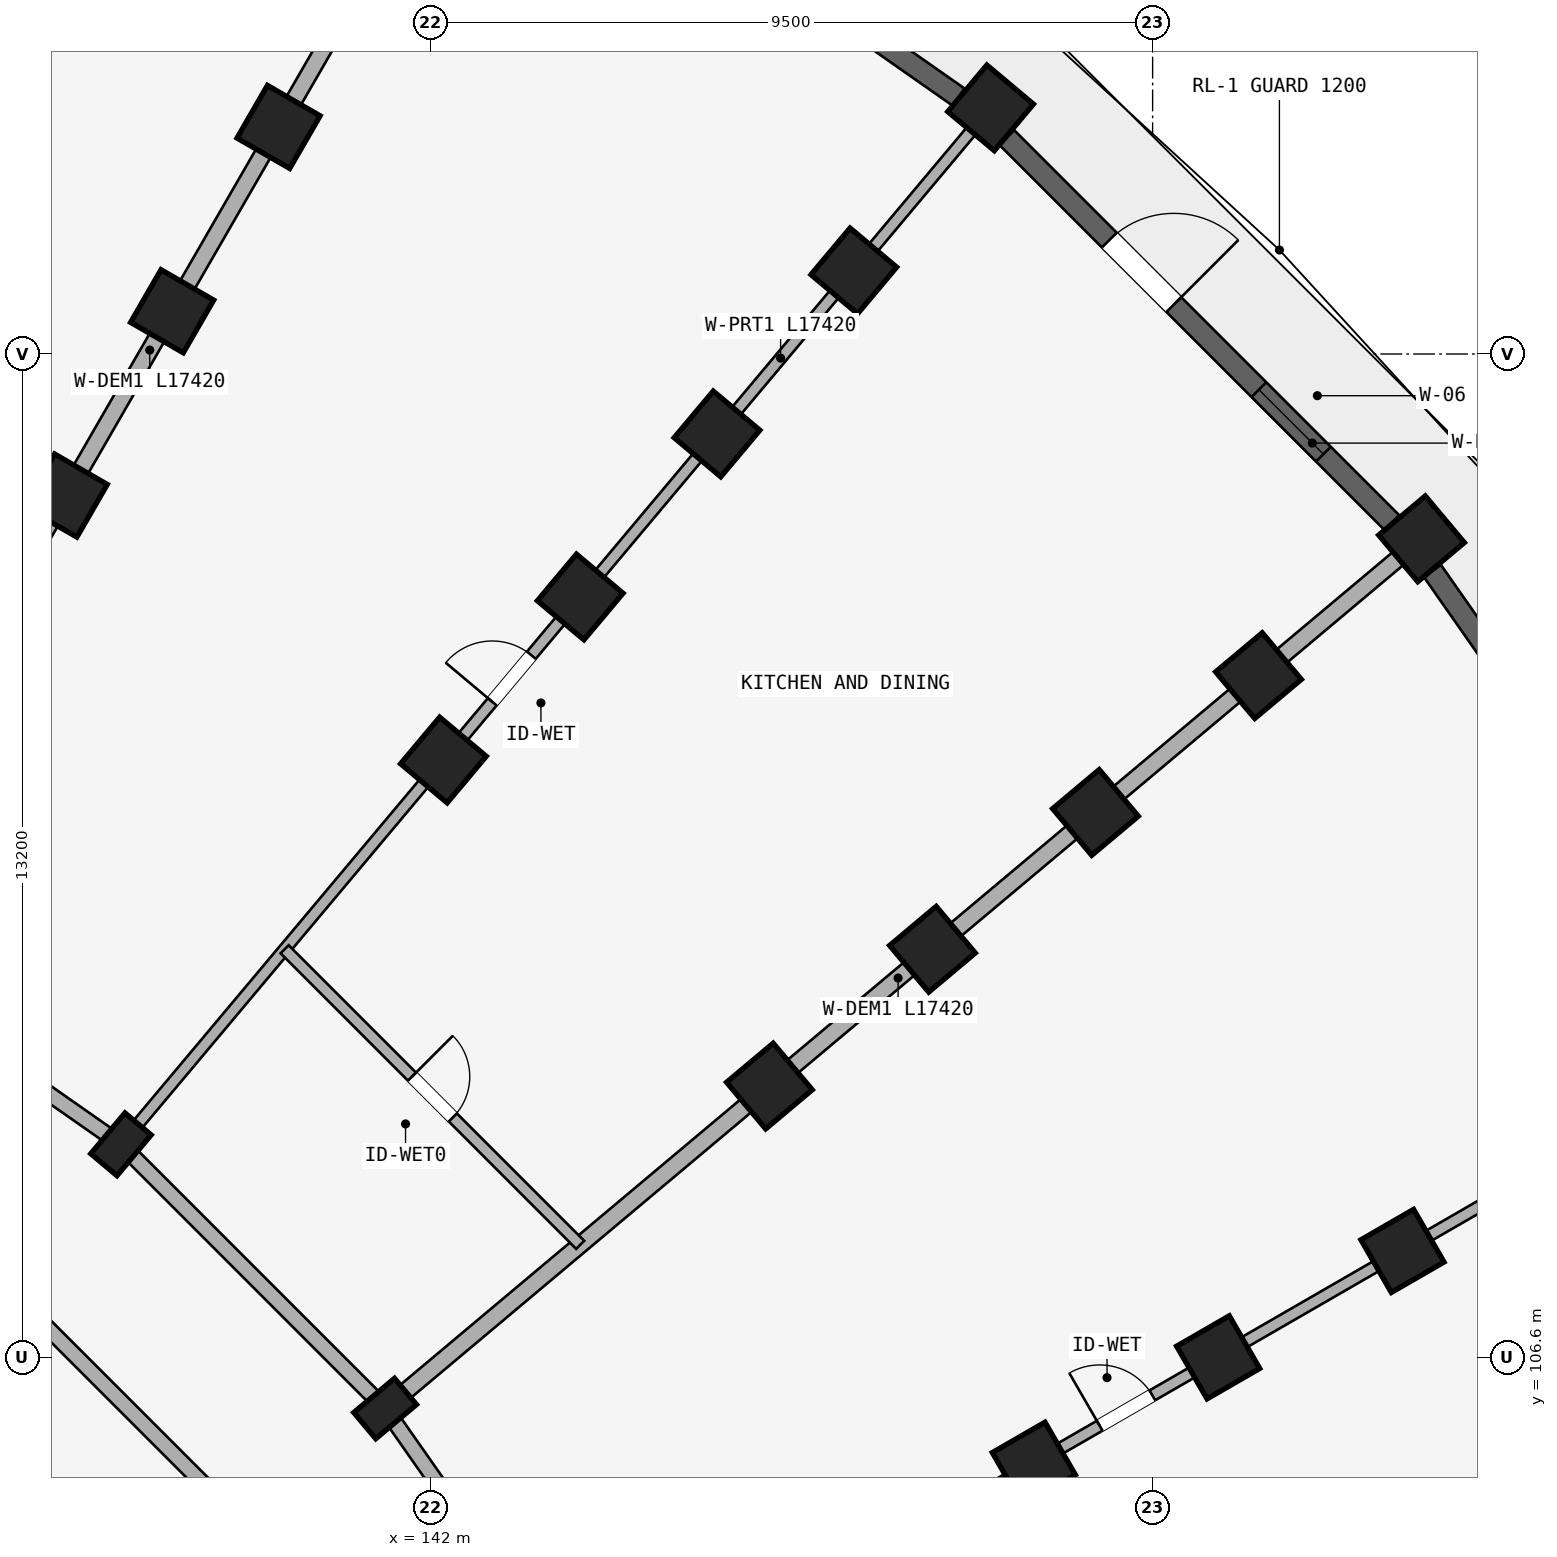
"""IFC4 building model, lengths in metres.
Left out: names, types, materials, properties, quantities, classifications, styles, units other than length and angle.
Written with IfcOpenShell. Run it as: python <this file> out.ifc"""

import sys

from ifc_helpers import new_model, si_unit, direction, frame, frame_2d, origin, origin_2d, place, context, subcontext, project, spatial, rectangle, extrude, element, fill, save


model = new_model("IFC4")
c1 = context("Model", 3, precision=1e-05, world=origin(), true_north=direction((0.0, 1.0)))
c2 = subcontext(c1, "Body", "Model", "MODEL_VIEW")
j1 = project(units=[si_unit("LENGTHUNIT", "METRE"), si_unit("PLANEANGLEUNIT", "RADIAN")], contexts=[c1])
p1 = place(None, origin())
s1 = spatial("IfcSite", under=j1, at=p1, CompositionType="ELEMENT")
p2 = place(p1, origin())
s2 = spatial("IfcBuilding", under=s1, at=p2, CompositionType="ELEMENT")
p3 = place(p2, frame((0.0, 0.0, 15.0)))
s3 = spatial("IfcBuildingStorey", under=s2, at=p3, CompositionType="ELEMENT", Elevation=15.0)
for number, where, z_axis, x_axis in (
    (1, (137.2, 117.938, 0.0), (0.0, 0.0, 1.0), (-0.866, 0.5, 0.0)),
    (2, (138.6, 120.363, 0.0), (0.0, 0.0, 1.0), (-0.866, 0.5, 0.0)),
    (3, (140.0, 122.787, 0.0), (0.0, 0.0, 1.0), (-0.866, 0.5, 0.0)),
):
    element("IfcColumn", number, at=place(p3, frame(where, z_axis=z_axis, x_axis=x_axis)), inside=s3, PredefinedType="COLUMN", context=c2, shape_type="SweptSolid", body=[
        extrude(rectangle(XDim=0.8, YDim=0.8, at=origin_2d()), origin(), (0.0, 0.0, 1.0), 2.93),
    ])
p4 = place(p3, frame((137.927, 109.402, 0.0), z_axis=(0.0, 0.0, 1.0), x_axis=(-0.766044443119, 0.642787609687, 0.0)))
e4 = element("IfcColumn", 4, at=p4, inside=s3, PredefinedType="COLUMN", context=c2, shape_type="SweptSolid", body=[
    extrude(rectangle(XDim=0.45, YDim=0.7, at=origin_2d()), origin(), (0.0, 0.0, 1.0), 2.93),
])
for number, where, z_axis, x_axis in (
    (5, (142.169, 114.458, 0.0), (0.0, 0.0, 1.0), (-0.766, 0.643, 0.0)),
    (6, (143.969, 116.603, 0.0), (0.0, 0.0, 1.0), (-0.766, 0.643, 0.0)),
    (7, (145.769, 118.748, 0.0), (0.0, 0.0, 1.0), (-0.766, 0.643, 0.0)),
    (8, (147.568, 120.893, 0.0), (0.0, 0.0, 1.0), (-0.766, 0.643, 0.0)),
    (9, (149.368, 123.038, 0.0), (0.0, 0.0, 1.0), (-0.766, 0.643, 0.0)),
):
    element("IfcColumn", number, at=place(p3, frame(where, z_axis=z_axis, x_axis=x_axis)), inside=s3, PredefinedType="COLUMN", context=c2, shape_type="SweptSolid", body=[
        extrude(rectangle(XDim=0.8, YDim=0.8, at=origin_2d()), origin(), (0.0, 0.0, 1.0), 2.93),
    ])
p5 = place(p3, frame((141.402, 105.927, 0.0), z_axis=(0.0, 0.0, 1.0), x_axis=(-0.642787609687, 0.766044443119, 0.0)))
e10 = element("IfcColumn", 10, at=p5, inside=s3, PredefinedType="COLUMN", context=c2, shape_type="SweptSolid", body=[
    extrude(rectangle(XDim=0.45, YDim=0.7, at=origin_2d()), origin(), (0.0, 0.0, 1.0), 2.93),
])
for number, where, z_axis, x_axis in (
    (11, (146.458, 110.169, 0.0), (0.0, 0.0, 1.0), (-0.643, 0.766, 0.0)),
    (12, (148.603, 111.969, 0.0), (0.0, 0.0, 1.0), (-0.643, 0.766, 0.0)),
    (13, (150.748, 113.769, 0.0), (0.0, 0.0, 1.0), (-0.643, 0.766, 0.0)),
    (14, (152.893, 115.568, 0.0), (0.0, 0.0, 1.0), (-0.643, 0.766, 0.0)),
    (15, (155.038, 117.368, 0.0), (0.0, 0.0, 1.0), (-0.643, 0.766, 0.0)),
    (16, (149.938, 105.2, 0.0), (0.0, 0.0, 1.0), (-0.5, 0.866, 0.0)),
    (17, (152.363, 106.6, 0.0), (0.0, 0.0, 1.0), (-0.5, 0.866, 0.0)),
    (18, (154.787, 108.0, 0.0), (0.0, 0.0, 1.0), (-0.5, 0.866, 0.0)),
):
    element("IfcColumn", number, at=place(p3, frame(where, z_axis=z_axis, x_axis=x_axis)), inside=s3, PredefinedType="COLUMN", context=c2, shape_type="SweptSolid", body=[
        extrude(rectangle(XDim=0.8, YDim=0.8, at=origin_2d()), origin(), (0.0, 0.0, 1.0), 2.93),
    ])
p6 = place(p3, frame((133.9, 112.222, 0.0), z_axis=(0.0, 0.0, 1.0), x_axis=(0.819140911474, -0.573592335331, 0.0)))
e19 = element("IfcWall", 19, at=p6, inside=s3, PredefinedType="STANDARD", context=c2, shape_type="SweptSolid", body=[
    extrude(rectangle(XDim=4.916, YDim=0.2, at=frame_2d((2.458, 0.0))), origin(), (0.0, 0.0, 1.0), 2.372),
])
p7 = place(p6, frame((1.888, 0.0, 0.0)))
e20 = element("IfcOpeningElement", 20, at=p7, cuts=e19, PredefinedType="OPENING", context=c2, shape_type="SweptSolid", body=[
    extrude(rectangle(XDim=1.14, YDim=2.15, at=frame_2d((0.57, 1.075))), frame((0.0, 0.11, 0.0), z_axis=(0.0, -1.0, 0.0), x_axis=(1.0, 0.0, 0.0)), (0.0, 0.0, 1.0), 0.22),
])
p8 = place(p3, frame((136.384, 107.564, 0.0), z_axis=(0.0, 0.0, 1.0), x_axis=(0.707106781187, -0.707106781187, 0.0)))
e21 = element("IfcWall", 21, at=p8, inside=s3, PredefinedType="STANDARD", context=c2, shape_type="SweptSolid", body=[
    extrude(rectangle(XDim=4.497, YDim=0.2, at=frame_2d((2.249, 0.0))), origin(), (0.0, 0.0, 1.0), 2.372),
])
p9 = place(p3, frame((137.927, 109.402, 0.0), z_axis=(0.0, 0.0, 1.0), x_axis=(0.707106781187, -0.707106781187, 0.0)))
e22 = element("IfcWall", 22, at=p9, inside=s3, PredefinedType="STANDARD", context=c2, shape_type="SweptSolid", body=[
    extrude(rectangle(XDim=4.916, YDim=0.2, at=frame_2d((2.458, 0.0))), origin(), (0.0, 0.0, 1.0), 2.372),
])
p10 = place(p3, frame((141.402, 105.927, 0.0), z_axis=(0.0, 0.0, 1.0), x_axis=(0.573592335331, -0.819140911474, 0.0)))
e23 = element("IfcWall", 23, at=p10, inside=s3, PredefinedType="STANDARD", context=c2, shape_type="SweptSolid", body=[
    extrude(rectangle(XDim=4.916, YDim=0.2, at=frame_2d((2.458, 0.0))), origin(), (0.0, 0.0, 1.0), 2.372),
])
p11 = place(p10, frame((1.958, 0.0, 0.0)))
e24 = element("IfcOpeningElement", 24, at=p11, cuts=e23, PredefinedType="OPENING", context=c2, shape_type="SweptSolid", body=[
    extrude(rectangle(XDim=1.0, YDim=2.15, at=frame_2d((0.5, 1.075))), frame((0.0, 0.11, 0.0), z_axis=(0.0, -1.0, 0.0), x_axis=(1.0, 0.0, 0.0)), (0.0, 0.0, 1.0), 0.22),
])
p12 = place(p3, frame((133.95, 112.309, 0.0), z_axis=(0.0, 0.0, 1.0), x_axis=(0.499997843263, 0.866026648973, 0.0)))
e25 = element("IfcWall", 25, at=p12, inside=s3, PredefinedType="STANDARD", context=c2, shape_type="SweptSolid", body=[
    extrude(rectangle(XDim=17.42, YDim=0.22, at=frame_2d((8.71, 0.0))), origin(), (0.0, 0.0, 1.0), 2.372),
])
p13 = place(p3, frame((137.991, 109.479, 0.0), z_axis=(0.0, 0.0, 1.0), x_axis=(0.642784757967, 0.766046835987, 0.0)))
e26 = element("IfcWall", 26, at=p13, inside=s3, PredefinedType="PARTITIONING", context=c2, shape_type="SweptSolid", body=[
    extrude(rectangle(XDim=17.42, YDim=0.15, at=frame_2d((8.71, 0.0))), origin(), (0.0, 0.0, 1.0), 2.372),
])
p14 = place(p13, frame((7.5, 0.0, 0.0)))
e27 = element("IfcOpeningElement", 27, at=p14, cuts=e26, PredefinedType="OPENING", context=c2, shape_type="SweptSolid", body=[
    extrude(rectangle(XDim=0.8, YDim=2.1, at=frame_2d((0.4, 1.05))), frame((0.0, 0.085, 0.0), z_axis=(0.0, -1.0, 0.0), x_axis=(1.0, 0.0, 0.0)), (0.0, 0.0, 1.0), 0.17),
])
p15 = place(p3, frame((141.479, 105.991, 0.0), z_axis=(0.0, 0.0, 1.0), x_axis=(0.766046835987, 0.642784757967, 0.0)))
e28 = element("IfcWall", 28, at=p15, inside=s3, PredefinedType="STANDARD", context=c2, shape_type="SweptSolid", body=[
    extrude(rectangle(XDim=17.42, YDim=0.22, at=frame_2d((8.71, 0.0))), origin(), (0.0, 0.0, 1.0), 2.372),
])
p16 = place(p3, frame((144.309, 101.95, 0.0), z_axis=(0.0, 0.0, 1.0), x_axis=(0.866026648973, 0.499997843263, 0.0)))
e29 = element("IfcWall", 29, at=p16, inside=s3, PredefinedType="PARTITIONING", context=c2, shape_type="SweptSolid", body=[
    extrude(rectangle(XDim=17.42, YDim=0.15, at=frame_2d((8.71, 0.0))), origin(), (0.0, 0.0, 1.0), 2.372),
])
p17 = place(p16, frame((7.5, 0.0, 0.0)))
e30 = element("IfcOpeningElement", 30, at=p17, cuts=e29, PredefinedType="OPENING", context=c2, shape_type="SweptSolid", body=[
    extrude(rectangle(XDim=0.8, YDim=2.1, at=frame_2d((0.4, 1.05))), frame((0.0, 0.085, 0.0), z_axis=(0.0, -1.0, 0.0), x_axis=(1.0, 0.0, 0.0)), (0.0, 0.0, 1.0), 0.17),
])
p18 = place(p3, frame((140.08, 111.969, 0.0), z_axis=(0.0, 0.0, 1.0), x_axis=(0.707106781187, -0.707106781187, 0.0)))
e31 = element("IfcWall", 31, at=p18, inside=s3, PredefinedType="PLUMBINGWALL", context=c2, shape_type="SweptSolid", body=[
    extrude(rectangle(XDim=5.5, YDim=0.15, at=frame_2d((2.75, 0.0))), origin(), (0.0, 0.0, 1.0), 2.372),
])
p19 = place(p18, frame((2.37, 0.0, 0.0)))
e32 = element("IfcOpeningElement", 32, at=p19, cuts=e31, PredefinedType="OPENING", context=c2, shape_type="SweptSolid", body=[
    extrude(rectangle(XDim=0.76, YDim=2.05, at=frame_2d((0.38, 1.025))), frame((0.0, 0.085, 0.0), z_axis=(0.0, -1.0, 0.0), x_axis=(1.0, 0.0, 0.0)), (0.0, 0.0, 1.0), 0.17),
])
p20 = place(p3, frame((143.078, 127.29, 0.0), z_axis=(0.0, 0.0, 1.0), x_axis=(0.819161471697, -0.573562972382, 0.0)))
e33 = element("IfcWall", 33, at=p20, inside=s3, PredefinedType="STANDARD", context=c2, shape_type="SweptSolid", body=[
    extrude(rectangle(XDim=7.164, YDim=0.275, at=frame_2d((3.582, 0.0))), origin(), (0.0, 0.0, 1.0), 2.472),
])
p21 = place(p20, frame((2.682, 0.0, 0.622)))
e34 = element("IfcOpeningElement", 34, at=p21, cuts=e33, PredefinedType="OPENING", context=c2, shape_type="SweptSolid", body=[
    extrude(rectangle(XDim=1.8, YDim=1.65, at=frame_2d((0.9, 0.825))), frame((0.0, 0.147, 0.0), z_axis=(0.0, -1.0, 0.0), x_axis=(1.0, 0.0, 0.0)), (0.0, 0.0, 1.0), 0.295),
])
p22 = place(p3, frame((149.582, 122.648, 0.0), z_axis=(0.0, 0.0, 1.0), x_axis=(0.707106781187, -0.707106781187, 0.0)))
e35 = element("IfcWall", 35, at=p22, inside=s3, PredefinedType="STANDARD", context=c2, shape_type="SweptSolid", body=[
    extrude(rectangle(XDim=7.164, YDim=0.275, at=frame_2d((3.582, 0.0))), origin(), (0.0, 0.0, 1.0), 2.472),
])
p23 = place(p22, frame((4.69, 0.0, 0.522)))
e36 = element("IfcOpeningElement", 36, at=p23, cuts=e35, PredefinedType="OPENING", context=c2, shape_type="SweptSolid", body=[
    extrude(rectangle(XDim=1.2, YDim=1.5, at=frame_2d((0.6, 0.75))), frame((0.0, 0.147, 0.0), z_axis=(0.0, -1.0, 0.0), x_axis=(1.0, 0.0, 0.0)), (0.0, 0.0, 1.0), 0.295),
])
p24 = place(p22, frame((1.907, 0.0, 0.0)))
e37 = element("IfcOpeningElement", 37, at=p24, cuts=e35, PredefinedType="OPENING", context=c2, shape_type="SweptSolid", body=[
    extrude(rectangle(XDim=1.2, YDim=2.15, at=frame_2d((0.6, 1.075))), frame((0.0, 0.147, 0.0), z_axis=(0.0, -1.0, 0.0), x_axis=(1.0, 0.0, 0.0)), (0.0, 0.0, 1.0), 0.295),
])
p25 = place(p3, frame((155.181, 116.947, 0.0), z_axis=(0.0, 0.0, 1.0), x_axis=(0.573562972382, -0.819161471697, 0.0)))
e38 = element("IfcWall", 38, at=p25, inside=s3, PredefinedType="STANDARD", context=c2, shape_type="SweptSolid", body=[
    extrude(rectangle(XDim=7.164, YDim=0.275, at=frame_2d((3.582, 0.0))), origin(), (0.0, 0.0, 1.0), 2.472),
])
p26 = place(p25, frame((2.457, 0.0, 0.322)))
e39 = element("IfcOpeningElement", 39, at=p26, cuts=e38, PredefinedType="OPENING", context=c2, shape_type="SweptSolid", body=[
    extrude(rectangle(XDim=2.25, YDim=1.95, at=frame_2d((1.125, 0.975))), frame((0.0, 0.147, 0.0), z_axis=(0.0, -1.0, 0.0), x_axis=(1.0, 0.0, 0.0)), (0.0, 0.0, 1.0), 0.295),
])
p27 = place(p23, origin())
e40 = element("IfcWindow", 40, at=p27, inside=s3, PartitioningType="SINGLE_PANEL", PredefinedType="WINDOW", context=c2, shape_type="SweptSolid", body=[
    extrude(rectangle(XDim=1.2, YDim=1.5, at=frame_2d((0.6, 0.75))), frame((0.0, 0.03, 0.0), z_axis=(0.0, -1.0, 0.0), x_axis=(1.0, 0.0, 0.0)), (0.0, 0.0, 1.0), 0.06),
])
fill(e36, e40)
p28 = place(p14, origin())
e41 = element("IfcDoor", 41, at=p28, inside=s3, OperationType="SINGLE_SWING_LEFT", PredefinedType="DOOR", context=c2, shape_type="SweptSolid", body=[
    extrude(rectangle(XDim=0.8, YDim=2.1, at=frame_2d((0.4, 1.05))), frame((0.0, 0.025, 0.0), z_axis=(0.0, -1.0, 0.0), x_axis=(1.0, 0.0, 0.0)), (0.0, 0.0, 1.0), 0.05),
])
fill(e27, e41)
p29 = place(p17, frame((0.8, 0.0, 0.0), z_axis=(0.0, 0.0, 1.0), x_axis=(-1.0, 0.0, 0.0)))
e42 = element("IfcDoor", 42, at=p29, inside=s3, OperationType="SINGLE_SWING_RIGHT", PredefinedType="DOOR", context=c2, shape_type="SweptSolid", body=[
    extrude(rectangle(XDim=0.8, YDim=2.1, at=frame_2d((0.4, 1.05))), frame((0.0, 0.025, 0.0), z_axis=(0.0, -1.0, 0.0), x_axis=(1.0, 0.0, 0.0)), (0.0, 0.0, 1.0), 0.05),
])
fill(e30, e42)
p30 = place(p19, origin())
e43 = element("IfcDoor", 43, at=p30, inside=s3, OperationType="SINGLE_SWING_LEFT", PredefinedType="DOOR", context=c2, shape_type="SweptSolid", body=[
    extrude(rectangle(XDim=0.76, YDim=2.05, at=frame_2d((0.38, 1.025))), frame((0.0, 0.025, 0.0), z_axis=(0.0, -1.0, 0.0), x_axis=(1.0, 0.0, 0.0)), (0.0, 0.0, 1.0), 0.05),
])
fill(e32, e43)
p31 = place(p24, origin())
e44 = element("IfcDoor", 44, at=p31, inside=s3, OperationType="SINGLE_SWING_RIGHT", PredefinedType="DOOR", context=c2, shape_type="SweptSolid", body=[
    extrude(rectangle(XDim=1.2, YDim=2.15, at=frame_2d((0.6, 1.075))), frame((0.0, 0.025, 0.0), z_axis=(0.0, -1.0, 0.0), x_axis=(1.0, 0.0, 0.0)), (0.0, 0.0, 1.0), 0.05),
])
fill(e37, e44)
save(model, sys.argv[1])
